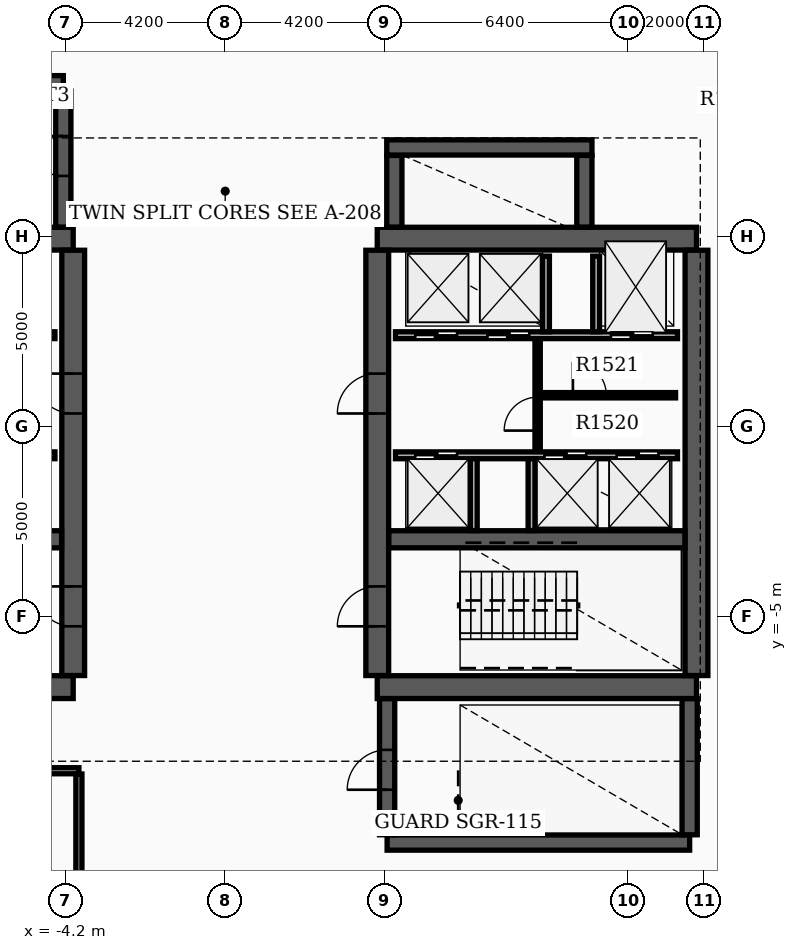
"""IFC4 building model, lengths in metres.
Left out: names, types, materials, properties, quantities, classifications, styles, units other than length and angle.
Written with IfcOpenShell. Run it as: python <this file> out.ifc"""

import sys

from ifc_helpers import new_model, si_unit, direction, frame, frame_2d, origin, place, context, subcontext, project, spatial, rectangle, extrude, element, fill, save


model = new_model("IFC4")
c1 = context("Model", 3, precision=1e-05, world=origin(), true_north=direction((0.0, 1.0)))
c2 = subcontext(c1, "Body", "Model", "MODEL_VIEW")
j1 = project(units=[si_unit("LENGTHUNIT", "METRE"), si_unit("PLANEANGLEUNIT", "RADIAN")], contexts=[c1])
p1 = place(None, origin())
s1 = spatial("IfcSite", under=j1, at=p1, CompositionType="ELEMENT")
p2 = place(p1, origin())
s2 = spatial("IfcBuilding", under=s1, at=p2, CompositionType="ELEMENT")
p3 = place(p2, frame((0.0, 0.0, 100.2)))
s3 = spatial("IfcBuildingStorey", under=s2, at=p3, CompositionType="ELEMENT", Elevation=100.2)
for number, where, z_axis, x_axis in (
    (1, (-12.4, -6.85, 0.0), (0.0, 0.0, 1.0), (1.0, 0.0, 0.0)),
    (2, (-12.4, 4.95, 0.0), (0.0, 0.0, 1.0), (1.0, 0.0, 0.0)),
):
    element("IfcWall", number, at=place(p3, frame(where, z_axis=z_axis, x_axis=x_axis)), inside=s3, PredefinedType="SHEAR", context=c2, shape_type="SweptSolid", body=[
        extrude(rectangle(XDim=8.4, YDim=0.6, at=frame_2d((4.2, 0.0))), origin(), (0.0, 0.0, 1.0), 4.3),
    ])
p4 = place(p3, frame((-4.0, -6.545, 0.0), z_axis=(0.0, 0.0, 1.0), x_axis=(0.0, 1.0, 0.0)))
e3 = element("IfcWall", 3, at=p4, inside=s3, PredefinedType="SHEAR", context=c2, shape_type="SweptSolid", body=[
    extrude(rectangle(XDim=11.19, YDim=0.6, at=frame_2d((5.595, 0.0))), origin(), (0.0, 0.0, 1.0), 4.3),
])
p5 = place(p4, frame((1.295, 0.0, 0.0)))
e4 = element("IfcOpeningElement", 4, at=p5, cuts=e3, PredefinedType="OPENING", context=c2, shape_type="SweptSolid", body=[
    extrude(rectangle(XDim=1.05, YDim=2.15, at=frame_2d((0.525, 1.075))), frame((0.0, 0.31, 0.0), z_axis=(0.0, -1.0, 0.0), x_axis=(1.0, 0.0, 0.0)), (0.0, 0.0, 1.0), 0.62),
])
p6 = place(p4, frame((6.895, 0.0, 0.0)))
e5 = element("IfcOpeningElement", 5, at=p6, cuts=e3, PredefinedType="OPENING", context=c2, shape_type="SweptSolid", body=[
    extrude(rectangle(XDim=1.05, YDim=2.15, at=frame_2d((0.525, 1.075))), frame((0.0, 0.31, 0.0), z_axis=(0.0, -1.0, 0.0), x_axis=(1.0, 0.0, 0.0)), (0.0, 0.0, 1.0), 0.62),
])
p7 = place(p3, frame((-12.095, -2.96, 0.0), z_axis=(0.0, 0.0, 1.0), x_axis=(1.0, 0.0, 0.0)))
e6 = element("IfcWall", 6, at=p7, inside=s3, PredefinedType="SHEAR", context=c2, shape_type="SweptSolid", body=[
    extrude(rectangle(XDim=7.79, YDim=0.45, at=frame_2d((3.895, 0.0))), origin(), (0.0, 0.0, 1.0), 4.3),
])
for number, where, z_axis, x_axis in (
    (7, (4.0, -6.85, 0.0), (0.0, 0.0, 1.0), (1.0, 0.0, 0.0)),
    (8, (4.0, 4.95, 0.0), (0.0, 0.0, 1.0), (1.0, 0.0, 0.0)),
):
    element("IfcWall", number, at=place(p3, frame(where, z_axis=z_axis, x_axis=x_axis)), inside=s3, PredefinedType="SHEAR", context=c2, shape_type="SweptSolid", body=[
        extrude(rectangle(XDim=8.4, YDim=0.6, at=frame_2d((4.2, 0.0))), origin(), (0.0, 0.0, 1.0), 4.3),
    ])
p8 = place(p3, frame((4.0, -6.545, 0.0), z_axis=(0.0, 0.0, 1.0), x_axis=(0.0, 1.0, 0.0)))
e9 = element("IfcWall", 9, at=p8, inside=s3, PredefinedType="SHEAR", context=c2, shape_type="SweptSolid", body=[
    extrude(rectangle(XDim=11.19, YDim=0.6, at=frame_2d((5.595, 0.0))), origin(), (0.0, 0.0, 1.0), 4.3),
])
p9 = place(p8, frame((1.295, 0.0, 0.0)))
e10 = element("IfcOpeningElement", 10, at=p9, cuts=e9, PredefinedType="OPENING", context=c2, shape_type="SweptSolid", body=[
    extrude(rectangle(XDim=1.05, YDim=2.15, at=frame_2d((0.525, 1.075))), frame((0.0, 0.31, 0.0), z_axis=(0.0, -1.0, 0.0), x_axis=(1.0, 0.0, 0.0)), (0.0, 0.0, 1.0), 0.62),
])
p10 = place(p8, frame((6.895, 0.0, 0.0)))
e11 = element("IfcOpeningElement", 11, at=p10, cuts=e9, PredefinedType="OPENING", context=c2, shape_type="SweptSolid", body=[
    extrude(rectangle(XDim=1.05, YDim=2.15, at=frame_2d((0.525, 1.075))), frame((0.0, 0.31, 0.0), z_axis=(0.0, -1.0, 0.0), x_axis=(1.0, 0.0, 0.0)), (0.0, 0.0, 1.0), 0.62),
])
p11 = place(p3, frame((12.4, -6.545, 0.0), z_axis=(0.0, 0.0, 1.0), x_axis=(0.0, 1.0, 0.0)))
e12 = element("IfcWall", 12, at=p11, inside=s3, PredefinedType="SHEAR", context=c2, shape_type="SweptSolid", body=[
    extrude(rectangle(XDim=11.19, YDim=0.6, at=frame_2d((5.595, 0.0))), origin(), (0.0, 0.0, 1.0), 4.3),
])
p12 = place(p3, frame((4.305, -2.96, 0.0), z_axis=(0.0, 0.0, 1.0), x_axis=(1.0, 0.0, 0.0)))
e13 = element("IfcWall", 13, at=p12, inside=s3, PredefinedType="SHEAR", context=c2, shape_type="SweptSolid", body=[
    extrude(rectangle(XDim=7.79, YDim=0.45, at=frame_2d((3.895, 0.0))), origin(), (0.0, 0.0, 1.0), 4.3),
])
p13 = place(p3, frame((-12.22, 9.04, 0.0), z_axis=(0.0, 0.0, 1.0), x_axis=(1.0, 0.0, 0.0)))
e14 = element("IfcWall", 14, at=p13, inside=s3, PredefinedType="SHEAR", context=c2, shape_type="SweptSolid", body=[
    extrude(rectangle(XDim=7.96, YDim=0.4, at=frame_2d((3.98, 0.0))), origin(), (0.0, 0.0, 1.0), 4.3),
])
p14 = place(p3, frame((-4.26, 5.255, 0.0), z_axis=(0.0, 0.0, 1.0), x_axis=(0.0, 1.0, 0.0)))
e15 = element("IfcWall", 15, at=p14, inside=s3, PredefinedType="SHEAR", context=c2, shape_type="SweptSolid", body=[
    extrude(rectangle(XDim=3.58, YDim=0.4, at=frame_2d((1.79, 0.0))), origin(), (0.0, 0.0, 1.0), 4.3),
])
p15 = place(p14, frame((1.345, 0.0, 0.0)))
e16 = element("IfcOpeningElement", 16, at=p15, cuts=e15, PredefinedType="OPENING", context=c2, shape_type="SweptSolid", body=[
    extrude(rectangle(XDim=1.05, YDim=2.15, at=frame_2d((0.525, 1.075))), frame((0.0, 0.21, 0.0), z_axis=(0.0, -1.0, 0.0), x_axis=(1.0, 0.0, 0.0)), (0.0, 0.0, 1.0), 0.42),
])
p16 = place(p3, frame((4.26, -10.94, 0.0), z_axis=(0.0, 0.0, 1.0), x_axis=(1.0, 0.0, 0.0)))
e17 = element("IfcWall", 17, at=p16, inside=s3, PredefinedType="SHEAR", context=c2, shape_type="SweptSolid", body=[
    extrude(rectangle(XDim=7.96, YDim=0.4, at=frame_2d((3.98, 0.0))), origin(), (0.0, 0.0, 1.0), 4.3),
])
p17 = place(p3, frame((4.26, -10.735, 0.0), z_axis=(0.0, 0.0, 1.0), x_axis=(0.0, 1.0, 0.0)))
e18 = element("IfcWall", 18, at=p17, inside=s3, PredefinedType="SHEAR", context=c2, shape_type="SweptSolid", body=[
    extrude(rectangle(XDim=3.58, YDim=0.4, at=frame_2d((1.79, 0.0))), origin(), (0.0, 0.0, 1.0), 4.3),
])
p18 = place(p17, frame((1.185, 0.0, 0.0)))
e19 = element("IfcOpeningElement", 19, at=p18, cuts=e18, PredefinedType="OPENING", context=c2, shape_type="SweptSolid", body=[
    extrude(rectangle(XDim=1.05, YDim=2.15, at=frame_2d((0.525, 1.075))), frame((0.0, 0.21, 0.0), z_axis=(0.0, -1.0, 0.0), x_axis=(1.0, 0.0, 0.0)), (0.0, 0.0, 1.0), 0.42),
])
p19 = place(p3, frame((12.22, -10.735, 0.0), z_axis=(0.0, 0.0, 1.0), x_axis=(0.0, 1.0, 0.0)))
e20 = element("IfcWall", 20, at=p19, inside=s3, PredefinedType="SHEAR", context=c2, shape_type="SweptSolid", body=[
    extrude(rectangle(XDim=3.58, YDim=0.4, at=frame_2d((1.79, 0.0))), origin(), (0.0, 0.0, 1.0), 4.3),
])
p20 = place(p3, frame((4.45, 5.255, 0.0), z_axis=(0.0, 0.0, 1.0), x_axis=(0.0, 1.0, 0.0)))
e21 = element("IfcWall", 21, at=p20, inside=s3, PredefinedType="SHEAR", context=c2, shape_type="SweptSolid", body=[
    extrude(rectangle(XDim=1.885, YDim=0.4, at=frame_2d((0.942, 0.0))), origin(), (0.0, 0.0, 1.0), 4.3),
])
p21 = place(p3, frame((4.25, 7.35, 0.0), z_axis=(0.0, 0.0, 1.0), x_axis=(1.0, 0.0, 0.0)))
e22 = element("IfcWall", 22, at=p21, inside=s3, PredefinedType="SHEAR", context=c2, shape_type="SweptSolid", body=[
    extrude(rectangle(XDim=5.4, YDim=0.4, at=frame_2d((2.7, 0.0))), origin(), (0.0, 0.0, 1.0), 4.3),
])
p22 = place(p3, frame((9.45, 5.255, 0.0), z_axis=(0.0, 0.0, 1.0), x_axis=(0.0, 1.0, 0.0)))
e23 = element("IfcWall", 23, at=p22, inside=s3, PredefinedType="SHEAR", context=c2, shape_type="SweptSolid", body=[
    extrude(rectangle(XDim=1.885, YDim=0.4, at=frame_2d((0.942, 0.0))), origin(), (0.0, 0.0, 1.0), 4.3),
])
p23 = place(p3, frame((-11.9, 2.41, 0.0), z_axis=(0.0, 0.0, 1.0), x_axis=(1.0, 0.0, 0.0)))
e24 = element("IfcWall", 24, at=p23, inside=s3, PredefinedType="SOLIDWALL", context=c2, shape_type="SweptSolid", body=[
    extrude(rectangle(XDim=7.42, YDim=0.18, at=frame_2d((3.71, 0.0))), origin(), (0.0, 0.0, 1.0), 3.37),
])
p24 = place(p23, frame((0.55, 0.0, 0.0)))
e25 = element("IfcOpeningElement", 25, at=p24, cuts=e24, PredefinedType="OPENING", context=c2, shape_type="SweptSolid", body=[
    extrude(rectangle(XDim=1.1, YDim=2.15, at=frame_2d((0.55, 1.075))), frame((0.0, 0.1, 0.0), z_axis=(0.0, -1.0, 0.0), x_axis=(1.0, 0.0, 0.0)), (0.0, 0.0, 1.0), 0.2),
])
p25 = place(p23, frame((3.85, 0.0, 0.0)))
e26 = element("IfcOpeningElement", 26, at=p25, cuts=e24, PredefinedType="OPENING", context=c2, shape_type="SweptSolid", body=[
    extrude(rectangle(XDim=1.1, YDim=2.15, at=frame_2d((0.55, 1.075))), frame((0.0, 0.1, 0.0), z_axis=(0.0, -1.0, 0.0), x_axis=(1.0, 0.0, 0.0)), (0.0, 0.0, 1.0), 0.2),
])
p26 = place(p23, frame((5.75, 0.0, 0.0)))
e27 = element("IfcOpeningElement", 27, at=p26, cuts=e24, PredefinedType="OPENING", context=c2, shape_type="SweptSolid", body=[
    extrude(rectangle(XDim=1.1, YDim=2.15, at=frame_2d((0.55, 1.075))), frame((0.0, 0.1, 0.0), z_axis=(0.0, -1.0, 0.0), x_axis=(1.0, 0.0, 0.0)), (0.0, 0.0, 1.0), 0.2),
])
p27 = place(p3, frame((4.48, 2.41, 0.0), z_axis=(0.0, 0.0, 1.0), x_axis=(1.0, 0.0, 0.0)))
e28 = element("IfcWall", 28, at=p27, inside=s3, PredefinedType="SOLIDWALL", context=c2, shape_type="SweptSolid", body=[
    extrude(rectangle(XDim=7.42, YDim=0.18, at=frame_2d((3.71, 0.0))), origin(), (0.0, 0.0, 1.0), 3.37),
])
p28 = place(p27, frame((5.67, 0.0, 0.0)))
e29 = element("IfcOpeningElement", 29, at=p28, cuts=e28, PredefinedType="OPENING", context=c2, shape_type="SweptSolid", body=[
    extrude(rectangle(XDim=1.1, YDim=2.15, at=frame_2d((0.55, 1.075))), frame((0.0, 0.1, 0.0), z_axis=(0.0, -1.0, 0.0), x_axis=(1.0, 0.0, 0.0)), (0.0, 0.0, 1.0), 0.2),
])
p29 = place(p27, frame((0.52, 0.0, 0.0)))
e30 = element("IfcOpeningElement", 30, at=p29, cuts=e28, PredefinedType="OPENING", context=c2, shape_type="SweptSolid", body=[
    extrude(rectangle(XDim=1.1, YDim=2.15, at=frame_2d((0.55, 1.075))), frame((0.0, 0.1, 0.0), z_axis=(0.0, -1.0, 0.0), x_axis=(1.0, 0.0, 0.0)), (0.0, 0.0, 1.0), 0.2),
])
p30 = place(p27, frame((2.42, 0.0, 0.0)))
e31 = element("IfcOpeningElement", 31, at=p30, cuts=e28, PredefinedType="OPENING", context=c2, shape_type="SweptSolid", body=[
    extrude(rectangle(XDim=1.1, YDim=2.15, at=frame_2d((0.55, 1.075))), frame((0.0, 0.1, 0.0), z_axis=(0.0, -1.0, 0.0), x_axis=(1.0, 0.0, 0.0)), (0.0, 0.0, 1.0), 0.2),
])
p31 = place(p3, frame((-11.9, -0.75, 0.0), z_axis=(0.0, 0.0, 1.0), x_axis=(1.0, 0.0, 0.0)))
e32 = element("IfcWall", 32, at=p31, inside=s3, PredefinedType="SOLIDWALL", context=c2, shape_type="SweptSolid", body=[
    extrude(rectangle(XDim=7.42, YDim=0.18, at=frame_2d((3.71, 0.0))), origin(), (0.0, 0.0, 1.0), 3.37),
])
p32 = place(p31, frame((0.45, 0.0, 0.0)))
e33 = element("IfcOpeningElement", 33, at=p32, cuts=e32, PredefinedType="OPENING", context=c2, shape_type="SweptSolid", body=[
    extrude(rectangle(XDim=1.1, YDim=2.15, at=frame_2d((0.55, 1.075))), frame((0.0, 0.1, 0.0), z_axis=(0.0, -1.0, 0.0), x_axis=(1.0, 0.0, 0.0)), (0.0, 0.0, 1.0), 0.2),
])
p33 = place(p31, frame((2.35, 0.0, 0.0)))
e34 = element("IfcOpeningElement", 34, at=p33, cuts=e32, PredefinedType="OPENING", context=c2, shape_type="SweptSolid", body=[
    extrude(rectangle(XDim=1.1, YDim=2.15, at=frame_2d((0.55, 1.075))), frame((0.0, 0.1, 0.0), z_axis=(0.0, -1.0, 0.0), x_axis=(1.0, 0.0, 0.0)), (0.0, 0.0, 1.0), 0.2),
])
p34 = place(p31, frame((5.75, 0.0, 0.0)))
e35 = element("IfcOpeningElement", 35, at=p34, cuts=e32, PredefinedType="OPENING", context=c2, shape_type="SweptSolid", body=[
    extrude(rectangle(XDim=1.1, YDim=2.15, at=frame_2d((0.55, 1.075))), frame((0.0, 0.1, 0.0), z_axis=(0.0, -1.0, 0.0), x_axis=(1.0, 0.0, 0.0)), (0.0, 0.0, 1.0), 0.2),
])
p35 = place(p3, frame((4.48, -0.75, 0.0), z_axis=(0.0, 0.0, 1.0), x_axis=(1.0, 0.0, 0.0)))
e36 = element("IfcWall", 36, at=p35, inside=s3, PredefinedType="SOLIDWALL", context=c2, shape_type="SweptSolid", body=[
    extrude(rectangle(XDim=7.42, YDim=0.18, at=frame_2d((3.71, 0.0))), origin(), (0.0, 0.0, 1.0), 3.37),
])
p36 = place(p35, frame((0.52, 0.0, 0.0)))
e37 = element("IfcOpeningElement", 37, at=p36, cuts=e36, PredefinedType="OPENING", context=c2, shape_type="SweptSolid", body=[
    extrude(rectangle(XDim=1.1, YDim=2.15, at=frame_2d((0.55, 1.075))), frame((0.0, 0.1, 0.0), z_axis=(0.0, -1.0, 0.0), x_axis=(1.0, 0.0, 0.0)), (0.0, 0.0, 1.0), 0.2),
])
p37 = place(p35, frame((3.92, 0.0, 0.0)))
e38 = element("IfcOpeningElement", 38, at=p37, cuts=e36, PredefinedType="OPENING", context=c2, shape_type="SweptSolid", body=[
    extrude(rectangle(XDim=1.1, YDim=2.15, at=frame_2d((0.55, 1.075))), frame((0.0, 0.1, 0.0), z_axis=(0.0, -1.0, 0.0), x_axis=(1.0, 0.0, 0.0)), (0.0, 0.0, 1.0), 0.2),
])
p38 = place(p35, frame((5.82, 0.0, 0.0)))
e39 = element("IfcOpeningElement", 39, at=p38, cuts=e36, PredefinedType="OPENING", context=c2, shape_type="SweptSolid", body=[
    extrude(rectangle(XDim=1.1, YDim=2.15, at=frame_2d((0.55, 1.075))), frame((0.0, 0.1, 0.0), z_axis=(0.0, -1.0, 0.0), x_axis=(1.0, 0.0, 0.0)), (0.0, 0.0, 1.0), 0.2),
])
for number, where, z_axis, x_axis in (
    (40, (8.44, 2.5, 0.0), (0.0, 0.0, 1.0), (0.0, 1.0, 0.0)),
    (41, (9.76, 2.5, 0.0), (0.0, 0.0, 1.0), (0.0, 1.0, 0.0)),
):
    element("IfcWall", number, at=place(p3, frame(where, z_axis=z_axis, x_axis=x_axis)), inside=s3, PredefinedType="SOLIDWALL", context=c2, shape_type="SweptSolid", body=[
        extrude(rectangle(XDim=1.99, YDim=0.18, at=frame_2d((0.995, 0.0))), origin(), (0.0, 0.0, 1.0), 3.37),
    ])
for number, where, z_axis, x_axis in (
    (42, (6.54, -2.73, 0.0), (0.0, 0.0, 1.0), (0.0, 1.0, 0.0)),
    (43, (8.06, -2.73, 0.0), (0.0, 0.0, 1.0), (0.0, 1.0, 0.0)),
):
    element("IfcWall", number, at=place(p3, frame(where, z_axis=z_axis, x_axis=x_axis)), inside=s3, PredefinedType="SOLIDWALL", context=c2, shape_type="SweptSolid", body=[
        extrude(rectangle(XDim=1.89, YDim=0.18, at=frame_2d((0.945, 0.0))), origin(), (0.0, 0.0, 1.0), 3.37),
    ])
p39 = place(p3, frame((8.22, -0.65, 0.0), z_axis=(0.0, 0.0, 1.0), x_axis=(0.0, 1.0, 0.0)))
e44 = element("IfcWall", 44, at=p39, inside=s3, PredefinedType="SOLIDWALL", context=c2, shape_type="SweptSolid", body=[
    extrude(rectangle(XDim=2.96, YDim=0.14, at=frame_2d((1.48, 0.0))), origin(), (0.0, 0.0, 1.0), 3.37),
])
p40 = place(p39, frame((0.55, 0.0, 0.0)))
e45 = element("IfcOpeningElement", 45, at=p40, cuts=e44, PredefinedType="OPENING", context=c2, shape_type="SweptSolid", body=[
    extrude(rectangle(XDim=0.88, YDim=2.1, at=frame_2d((0.44, 1.05))), frame((0.0, 0.08, 0.0), z_axis=(0.0, -1.0, 0.0), x_axis=(1.0, 0.0, 0.0)), (0.0, 0.0, 1.0), 0.16),
])
p41 = place(p3, frame((8.298, 0.83, 0.0), z_axis=(0.0, 0.0, 1.0), x_axis=(1.0, 0.0, 0.0)))
e46 = element("IfcWall", 46, at=p41, inside=s3, PredefinedType="PARTITIONING", context=c2, shape_type="SweptSolid", body=[
    extrude(rectangle(XDim=3.552, YDim=0.14, at=frame_2d((1.776, 0.0))), origin(), (0.0, 0.0, 1.0), 3.37),
])
p42 = place(p41, frame((0.85, 0.0, 0.0)))
e47 = element("IfcOpeningElement", 47, at=p42, cuts=e46, PredefinedType="OPENING", context=c2, shape_type="SweptSolid", body=[
    extrude(rectangle(XDim=0.88, YDim=2.1, at=frame_2d((0.44, 1.05))), frame((0.0, 0.08, 0.0), z_axis=(0.0, -1.0, 0.0), x_axis=(1.0, 0.0, 0.0)), (0.0, 0.0, 1.0), 0.16),
])
p43 = place(p3, frame((-12.4, -9.05, 0.0), z_axis=(0.0, 0.0, 1.0), x_axis=(1.0, 0.0, 0.0)))
e48 = element("IfcWall", 48, at=p43, inside=s3, PredefinedType="PARTITIONING", context=c2, shape_type="SweptSolid", body=[
    extrude(rectangle(XDim=8.55, YDim=0.16, at=frame_2d((4.275, 0.0))), origin(), (0.0, 0.0, 1.0), 3.37),
])
p44 = place(p43, frame((3.795, 0.0, 0.0)))
e49 = element("IfcOpeningElement", 49, at=p44, cuts=e48, PredefinedType="OPENING", context=c2, shape_type="SweptSolid", body=[
    extrude(rectangle(XDim=0.96, YDim=2.15, at=frame_2d((0.48, 1.075))), frame((0.0, 0.09, 0.0), z_axis=(0.0, -1.0, 0.0), x_axis=(1.0, 0.0, 0.0)), (0.0, 0.0, 1.0), 0.18),
])
p45 = place(p3, frame((-3.85, -13.065, 0.0), z_axis=(0.0, 0.0, 1.0), x_axis=(0.0, 1.0, 0.0)))
e50 = element("IfcWall", 50, at=p45, inside=s3, PredefinedType="PARTITIONING", context=c2, shape_type="SweptSolid", body=[
    extrude(rectangle(XDim=3.93, YDim=0.16, at=frame_2d((1.965, 0.0))), origin(), (0.0, 0.0, 1.0), 3.37),
])
p46 = place(p5, origin())
e51 = element("IfcDoor", 51, at=p46, inside=s3, OperationType="SINGLE_SWING_RIGHT", PredefinedType="DOOR", context=c2, shape_type="SweptSolid", body=[
    extrude(rectangle(XDim=1.05, YDim=2.15, at=frame_2d((0.525, 1.075))), frame((0.0, 0.025, 0.0), z_axis=(0.0, -1.0, 0.0), x_axis=(1.0, 0.0, 0.0)), (0.0, 0.0, 1.0), 0.05),
])
fill(e4, e51)
p47 = place(p9, origin())
e52 = element("IfcDoor", 52, at=p47, inside=s3, OperationType="SINGLE_SWING_LEFT", PredefinedType="DOOR", context=c2, shape_type="SweptSolid", body=[
    extrude(rectangle(XDim=1.05, YDim=2.15, at=frame_2d((0.525, 1.075))), frame((0.0, 0.025, 0.0), z_axis=(0.0, -1.0, 0.0), x_axis=(1.0, 0.0, 0.0)), (0.0, 0.0, 1.0), 0.05),
])
fill(e10, e52)
p48 = place(p6, origin())
e53 = element("IfcDoor", 53, at=p48, inside=s3, OperationType="SINGLE_SWING_RIGHT", PredefinedType="DOOR", context=c2, shape_type="SweptSolid", body=[
    extrude(rectangle(XDim=1.05, YDim=2.15, at=frame_2d((0.525, 1.075))), frame((0.0, 0.025, 0.0), z_axis=(0.0, -1.0, 0.0), x_axis=(1.0, 0.0, 0.0)), (0.0, 0.0, 1.0), 0.05),
])
fill(e5, e53)
p49 = place(p10, origin())
e54 = element("IfcDoor", 54, at=p49, inside=s3, OperationType="SINGLE_SWING_LEFT", PredefinedType="DOOR", context=c2, shape_type="SweptSolid", body=[
    extrude(rectangle(XDim=1.05, YDim=2.15, at=frame_2d((0.525, 1.075))), frame((0.0, 0.025, 0.0), z_axis=(0.0, -1.0, 0.0), x_axis=(1.0, 0.0, 0.0)), (0.0, 0.0, 1.0), 0.05),
])
fill(e11, e54)
p50 = place(p15, origin())
e55 = element("IfcDoor", 55, at=p50, inside=s3, OperationType="SINGLE_SWING_RIGHT", PredefinedType="DOOR", context=c2, shape_type="SweptSolid", body=[
    extrude(rectangle(XDim=1.05, YDim=2.15, at=frame_2d((0.525, 1.075))), frame((0.0, 0.025, 0.0), z_axis=(0.0, -1.0, 0.0), x_axis=(1.0, 0.0, 0.0)), (0.0, 0.0, 1.0), 0.05),
])
fill(e16, e55)
p51 = place(p18, origin())
e56 = element("IfcDoor", 56, at=p51, inside=s3, OperationType="SINGLE_SWING_LEFT", PredefinedType="DOOR", context=c2, shape_type="SweptSolid", body=[
    extrude(rectangle(XDim=1.05, YDim=2.15, at=frame_2d((0.525, 1.075))), frame((0.0, 0.025, 0.0), z_axis=(0.0, -1.0, 0.0), x_axis=(1.0, 0.0, 0.0)), (0.0, 0.0, 1.0), 0.05),
])
fill(e19, e56)
p52 = place(p28, origin())
e57 = element("IfcDoor", 57, at=p52, inside=s3, OperationType="DOUBLE_DOOR_SLIDING", PredefinedType="DOOR", context=c2, shape_type="SweptSolid", body=[
    extrude(rectangle(XDim=1.1, YDim=2.15, at=frame_2d((0.55, 1.075))), frame((0.0, 0.025, 0.0), z_axis=(0.0, -1.0, 0.0), x_axis=(1.0, 0.0, 0.0)), (0.0, 0.0, 1.0), 0.05),
])
fill(e29, e57)
p53 = place(p29, origin())
e58 = element("IfcDoor", 58, at=p53, inside=s3, OperationType="DOUBLE_DOOR_SLIDING", PredefinedType="DOOR", context=c2, shape_type="SweptSolid", body=[
    extrude(rectangle(XDim=1.1, YDim=2.15, at=frame_2d((0.55, 1.075))), frame((0.0, 0.025, 0.0), z_axis=(0.0, -1.0, 0.0), x_axis=(1.0, 0.0, 0.0)), (0.0, 0.0, 1.0), 0.05),
])
fill(e30, e58)
p54 = place(p30, origin())
e59 = element("IfcDoor", 59, at=p54, inside=s3, OperationType="DOUBLE_DOOR_SLIDING", PredefinedType="DOOR", context=c2, shape_type="SweptSolid", body=[
    extrude(rectangle(XDim=1.1, YDim=2.15, at=frame_2d((0.55, 1.075))), frame((0.0, 0.025, 0.0), z_axis=(0.0, -1.0, 0.0), x_axis=(1.0, 0.0, 0.0)), (0.0, 0.0, 1.0), 0.05),
])
fill(e31, e59)
p55 = place(p36, origin())
e60 = element("IfcDoor", 60, at=p55, inside=s3, OperationType="DOUBLE_DOOR_SLIDING", PredefinedType="DOOR", context=c2, shape_type="SweptSolid", body=[
    extrude(rectangle(XDim=1.1, YDim=2.15, at=frame_2d((0.55, 1.075))), frame((0.0, 0.025, 0.0), z_axis=(0.0, -1.0, 0.0), x_axis=(1.0, 0.0, 0.0)), (0.0, 0.0, 1.0), 0.05),
])
fill(e37, e60)
p56 = place(p37, origin())
e61 = element("IfcDoor", 61, at=p56, inside=s3, OperationType="DOUBLE_DOOR_SLIDING", PredefinedType="DOOR", context=c2, shape_type="SweptSolid", body=[
    extrude(rectangle(XDim=1.1, YDim=2.15, at=frame_2d((0.55, 1.075))), frame((0.0, 0.025, 0.0), z_axis=(0.0, -1.0, 0.0), x_axis=(1.0, 0.0, 0.0)), (0.0, 0.0, 1.0), 0.05),
])
fill(e38, e61)
p57 = place(p38, origin())
e62 = element("IfcDoor", 62, at=p57, inside=s3, OperationType="DOUBLE_DOOR_SLIDING", PredefinedType="DOOR", context=c2, shape_type="SweptSolid", body=[
    extrude(rectangle(XDim=1.1, YDim=2.15, at=frame_2d((0.55, 1.075))), frame((0.0, 0.025, 0.0), z_axis=(0.0, -1.0, 0.0), x_axis=(1.0, 0.0, 0.0)), (0.0, 0.0, 1.0), 0.05),
])
fill(e39, e62)
p58 = place(p40, origin())
e63 = element("IfcDoor", 63, at=p58, inside=s3, OperationType="SINGLE_SWING_LEFT", PredefinedType="DOOR", context=c2, shape_type="SweptSolid", body=[
    extrude(rectangle(XDim=0.88, YDim=2.1, at=frame_2d((0.44, 1.05))), frame((0.0, 0.025, 0.0), z_axis=(0.0, -1.0, 0.0), x_axis=(1.0, 0.0, 0.0)), (0.0, 0.0, 1.0), 0.05),
])
fill(e45, e63)
p59 = place(p42, origin())
e64 = element("IfcDoor", 64, at=p59, inside=s3, OperationType="SINGLE_SWING_LEFT", PredefinedType="DOOR", context=c2, shape_type="SweptSolid", body=[
    extrude(rectangle(XDim=0.88, YDim=2.1, at=frame_2d((0.44, 1.05))), frame((0.0, 0.025, 0.0), z_axis=(0.0, -1.0, 0.0), x_axis=(1.0, 0.0, 0.0)), (0.0, 0.0, 1.0), 0.05),
])
fill(e47, e64)
save(model, sys.argv[1])
